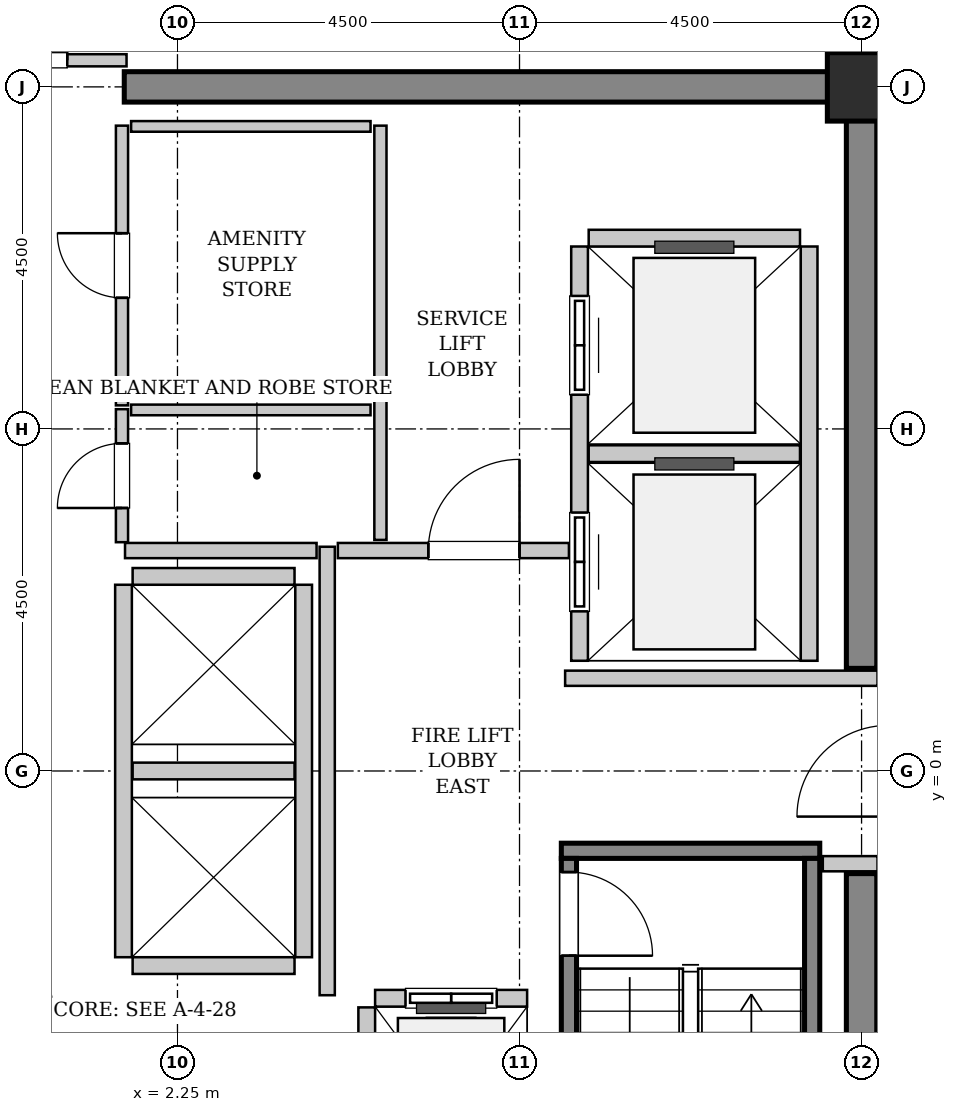
"""IFC4 building model, lengths in metres.
Left out: names, types, materials, properties, quantities, classifications, styles, units other than length and angle.
Written with IfcOpenShell. Run it as: python <this file> out.ifc"""

import sys

from ifc_helpers import new_model, si_unit, direction, frame, frame_2d, origin, origin_2d, place, context, subcontext, project, spatial, rectangle, extrude, source, transform, mapped, element, fill, save


model = new_model("IFC4")
c1 = context("Model", 3, precision=1e-05, world=origin(), true_north=direction((0.0, 1.0)))
c2 = subcontext(c1, "Body", "Model", "MODEL_VIEW")
j1 = project(units=[si_unit("LENGTHUNIT", "METRE"), si_unit("PLANEANGLEUNIT", "RADIAN")], contexts=[c1])
p1 = place(None, origin())
s1 = spatial("IfcSite", under=j1, at=p1, CompositionType="ELEMENT")
p2 = place(p1, origin())
s2 = spatial("IfcBuilding", under=s1, at=p2, CompositionType="ELEMENT")
p3 = place(p2, frame((0.0, 0.0, 330.0)))
s3 = spatial("IfcBuildingStorey", under=s2, at=p3, CompositionType="ELEMENT", Elevation=330.0)
m1 = source(origin(), c2, "Body", "SweptSolid", [
    extrude(rectangle(XDim=9.9, YDim=0.4, at=frame_2d((4.95, 0.0))), origin(), (0.0, 0.0, 1.0), 3.8),
])
p4 = place(p3, frame((1.55, 9.0, 0.0), z_axis=(0.0, 0.0, 1.0), x_axis=(1.0, 0.0, 0.0)))
e1 = element("IfcWall", 1, at=p4, inside=s3, PredefinedType="SHEAR", context=c2, shape_type="MappedRepresentation", body=[
    mapped(m1, transform((0.0, 0.0, 0.0), x_axis=(1.0, 0.0, 0.0), y_axis=(0.0, 1.0, 0.0), z_axis=(0.0, 0.0, 1.0), scale=1.0)),
])
m2 = source(origin(), c2, "Body", "SweptSolid", [
    extrude(rectangle(XDim=7.45, YDim=0.4, at=frame_2d((3.725, 0.0))), origin(), (0.0, 0.0, 1.0), 3.8),
])
for number, where, z_axis, x_axis in (
    (2, (11.25, -8.8, 0.0), (0.0, 0.0, 1.0), (0.0, 1.0, 0.0)),
    (3, (11.25, 1.35, 0.0), (0.0, 0.0, 1.0), (0.0, 1.0, 0.0)),
):
    element("IfcWall", number, at=place(p3, frame(where, z_axis=z_axis, x_axis=x_axis)), inside=s3, PredefinedType="SHEAR", context=c2, shape_type="MappedRepresentation", body=[
        mapped(m2, transform((0.0, 0.0, 0.0), x_axis=(1.0, 0.0, 0.0), y_axis=(0.0, 1.0, 0.0), z_axis=(0.0, 0.0, 1.0), scale=1.0)),
    ])
m3 = source(origin(), c2, "Body", "SweptSolid", [
    extrude(rectangle(XDim=0.9, YDim=0.9, at=origin_2d()), origin(), (0.0, 0.0, 1.0), 3.8),
])
p5 = place(p3, frame((11.25, 9.0, 0.0), z_axis=(0.0, 0.0, 1.0), x_axis=(1.0, 0.0, 0.0)))
e4 = element("IfcColumn", 4, at=p5, inside=s3, PredefinedType="COLUMN", context=c2, shape_type="MappedRepresentation", body=[
    mapped(m3, transform((0.0, 0.0, 0.0), x_axis=(1.0, 0.0, 0.0), y_axis=(0.0, 1.0, 0.0), z_axis=(0.0, 0.0, 1.0), scale=1.0)),
])
m4 = source(origin(), c2, "Body", "SweptSolid", [
    extrude(rectangle(XDim=3.4, YDim=0.2, at=frame_2d((1.7, 0.0))), origin(), (0.0, 0.0, 1.0), 3.8),
])
p6 = place(p3, frame((7.3, -1.05, 0.0), z_axis=(0.0, 0.0, 1.0), x_axis=(1.0, 0.0, 0.0)))
e5 = element("IfcWall", 5, at=p6, inside=s3, PredefinedType="SOLIDWALL", context=c2, shape_type="MappedRepresentation", body=[
    mapped(m4, transform((0.0, 0.0, 0.0), x_axis=(1.0, 0.0, 0.0), y_axis=(0.0, 1.0, 0.0), z_axis=(0.0, 0.0, 1.0), scale=1.0)),
])
m5 = source(origin(), c2, "Body", "SweptSolid", [
    extrude(rectangle(XDim=7.1, YDim=0.2, at=frame_2d((3.55, 0.0))), origin(), (0.0, 0.0, 1.0), 3.8),
])
p7 = place(p3, frame((7.4, -1.15, 0.0), z_axis=(0.0, 0.0, 1.0), x_axis=(0.0, -1.0, 0.0)))
e6 = element("IfcWall", 6, at=p7, inside=s3, PredefinedType="SOLIDWALL", context=c2, shape_type="MappedRepresentation", body=[
    mapped(m5, transform((0.0, 0.0, 0.0), x_axis=(1.0, 0.0, 0.0), y_axis=(0.0, 1.0, 0.0), z_axis=(0.0, 0.0, 1.0), scale=1.0)),
])
p8 = place(p7, frame((0.18, 0.0, 0.0)))
e7 = element("IfcOpeningElement", 7, at=p8, cuts=e6, PredefinedType="OPENING", context=c2, shape_type="SweptSolid", body=[
    extrude(rectangle(XDim=1.1, YDim=2.15, at=frame_2d((0.55, 1.075))), frame((0.0, 0.11, 0.0), z_axis=(0.0, -1.0, 0.0), x_axis=(1.0, 0.0, 0.0)), (0.0, 0.0, 1.0), 0.22),
])
p9 = place(p3, frame((10.6, -1.15, 0.0), z_axis=(0.0, 0.0, 1.0), x_axis=(0.0, -1.0, 0.0)))
e8 = element("IfcWall", 8, at=p9, inside=s3, PredefinedType="SOLIDWALL", context=c2, shape_type="MappedRepresentation", body=[
    mapped(m5, transform((0.0, 0.0, 0.0), x_axis=(1.0, 0.0, 0.0), y_axis=(0.0, 1.0, 0.0), z_axis=(0.0, 0.0, 1.0), scale=1.0)),
])
m6 = source(origin(), c2, "Body", "SweptSolid", [
    extrude(rectangle(XDim=2.0, YDim=0.22, at=frame_2d((1.0, 0.0))), origin(), (0.0, 0.0, 1.0), 3.535),
])
p10 = place(p3, frame((6.85, -2.99, 0.0), z_axis=(0.0, 0.0, 1.0), x_axis=(-1.0, 0.0, 0.0)))
e9 = element("IfcWall", 9, at=p10, inside=s3, PredefinedType="SOLIDWALL", context=c2, shape_type="MappedRepresentation", body=[
    mapped(m6, transform((0.0, 0.0, 0.0), x_axis=(1.0, 0.0, 0.0), y_axis=(0.0, 1.0, 0.0), z_axis=(0.0, 0.0, 1.0), scale=1.0)),
])
p11 = place(p10, frame((0.4, 0.0, 0.0)))
e10 = element("IfcOpeningElement", 10, at=p11, cuts=e9, PredefinedType="OPENING", context=c2, shape_type="SweptSolid", body=[
    extrude(rectangle(XDim=1.2, YDim=2.2, at=frame_2d((0.6, 1.1))), frame((0.0, 0.12, 0.0), z_axis=(0.0, -1.0, 0.0), x_axis=(1.0, 0.0, 0.0)), (0.0, 0.0, 1.0), 0.24),
])
m7 = source(origin(), c2, "Body", "SweptSolid", [
    extrude(rectangle(XDim=2.68, YDim=0.22, at=frame_2d((1.34, 0.0))), origin(), (0.0, 0.0, 1.0), 3.535),
])
p12 = place(p3, frame((4.74, -3.11, 0.0), z_axis=(0.0, 0.0, 1.0), x_axis=(0.0, -1.0, 0.0)))
e11 = element("IfcWall", 11, at=p12, inside=s3, PredefinedType="SOLIDWALL", context=c2, shape_type="MappedRepresentation", body=[
    mapped(m7, transform((0.0, 0.0, 0.0), x_axis=(1.0, 0.0, 0.0), y_axis=(0.0, 1.0, 0.0), z_axis=(0.0, 0.0, 1.0), scale=1.0)),
])
m8 = source(origin(), c2, "Body", "SweptSolid", [
    extrude(rectangle(XDim=5.45, YDim=0.22, at=frame_2d((2.725, 0.0))), origin(), (0.0, 0.0, 1.0), 3.535),
])
p13 = place(p3, frame((7.54, 6.9, 0.0), z_axis=(0.0, 0.0, 1.0), x_axis=(0.0, -1.0, 0.0)))
e12 = element("IfcWall", 12, at=p13, inside=s3, PredefinedType="SOLIDWALL", context=c2, shape_type="MappedRepresentation", body=[
    mapped(m8, transform((0.0, 0.0, 0.0), x_axis=(1.0, 0.0, 0.0), y_axis=(0.0, 1.0, 0.0), z_axis=(0.0, 0.0, 1.0), scale=1.0)),
])
p14 = place(p13, frame((3.5, 0.0, 0.0)))
e13 = element("IfcOpeningElement", 13, at=p14, cuts=e12, PredefinedType="OPENING", context=c2, shape_type="SweptSolid", body=[
    extrude(rectangle(XDim=1.3, YDim=2.3, at=frame_2d((0.65, 1.15))), frame((0.0, 0.12, 0.0), z_axis=(0.0, -1.0, 0.0), x_axis=(1.0, 0.0, 0.0)), (0.0, 0.0, 1.0), 0.24),
])
p15 = place(p13, frame((0.65, 0.0, 0.0)))
e14 = element("IfcOpeningElement", 14, at=p15, cuts=e12, PredefinedType="OPENING", context=c2, shape_type="SweptSolid", body=[
    extrude(rectangle(XDim=1.3, YDim=2.3, at=frame_2d((0.65, 1.15))), frame((0.0, 0.12, 0.0), z_axis=(0.0, -1.0, 0.0), x_axis=(1.0, 0.0, 0.0)), (0.0, 0.0, 1.0), 0.24),
])
p16 = place(p3, frame((10.56, 1.45, 0.0), z_axis=(0.0, 0.0, 1.0), x_axis=(0.0, 1.0, 0.0)))
e15 = element("IfcWall", 15, at=p16, inside=s3, PredefinedType="SOLIDWALL", context=c2, shape_type="MappedRepresentation", body=[
    mapped(m8, transform((0.0, 0.0, 0.0), x_axis=(1.0, 0.0, 0.0), y_axis=(0.0, 1.0, 0.0), z_axis=(0.0, 0.0, 1.0), scale=1.0)),
])
m9 = source(origin(), c2, "Body", "SweptSolid", [
    extrude(rectangle(XDim=2.78, YDim=0.22, at=frame_2d((1.39, 0.0))), origin(), (0.0, 0.0, 1.0), 3.535),
])
for number, where, z_axis, x_axis in (
    (16, (7.66, 4.175, 0.0), (0.0, 0.0, 1.0), (1.0, 0.0, 0.0)),
    (17, (10.44, 7.01, 0.0), (0.0, 0.0, 1.0), (-1.0, 0.0, 0.0)),
):
    element("IfcWall", number, at=place(p3, frame(where, z_axis=z_axis, x_axis=x_axis)), inside=s3, PredefinedType="SOLIDWALL", context=c2, shape_type="MappedRepresentation", body=[
        mapped(m9, transform((0.0, 0.0, 0.0), x_axis=(1.0, 0.0, 0.0), y_axis=(0.0, 1.0, 0.0), z_axis=(0.0, 0.0, 1.0), scale=1.0)),
    ])
m10 = source(origin(), c2, "Body", "SweptSolid", [
    extrude(rectangle(XDim=4.9, YDim=0.22, at=frame_2d((2.45, 0.0))), origin(), (0.0, 0.0, 1.0), 3.535),
])
for number, where, z_axis, x_axis in (
    (18, (1.54, 2.45, 0.0), (0.0, 0.0, 1.0), (0.0, -1.0, 0.0)),
    (19, (3.91, -2.45, 0.0), (0.0, 0.0, 1.0), (0.0, 1.0, 0.0)),
):
    element("IfcWall", number, at=place(p3, frame(where, z_axis=z_axis, x_axis=x_axis)), inside=s3, PredefinedType="SOLIDWALL", context=c2, shape_type="MappedRepresentation", body=[
        mapped(m10, transform((0.0, 0.0, 0.0), x_axis=(1.0, 0.0, 0.0), y_axis=(0.0, 1.0, 0.0), z_axis=(0.0, 0.0, 1.0), scale=1.0)),
    ])
m11 = source(origin(), c2, "Body", "SweptSolid", [
    extrude(rectangle(XDim=2.13, YDim=0.22, at=frame_2d((1.065, 0.0))), origin(), (0.0, 0.0, 1.0), 3.535),
])
for number, where, z_axis, x_axis in (
    (20, (1.66, -2.56, 0.0), (0.0, 0.0, 1.0), (1.0, 0.0, 0.0)),
    (21, (1.66, 0.0, 0.0), (0.0, 0.0, 1.0), (1.0, 0.0, 0.0)),
    (22, (3.79, 2.56, 0.0), (0.0, 0.0, 1.0), (-1.0, 0.0, 0.0)),
):
    element("IfcWall", number, at=place(p3, frame(where, z_axis=z_axis, x_axis=x_axis)), inside=s3, PredefinedType="SOLIDWALL", context=c2, shape_type="MappedRepresentation", body=[
        mapped(m11, transform((0.0, 0.0, 0.0), x_axis=(1.0, 0.0, 0.0), y_axis=(0.0, 1.0, 0.0), z_axis=(0.0, 0.0, 1.0), scale=1.0)),
    ])
m12 = source(origin(), c2, "Body", "SweptSolid", [
    extrude(rectangle(XDim=5.9, YDim=0.2, at=frame_2d((2.95, 0.0))), origin(), (0.0, 0.0, 1.0), 3.535),
])
p17 = place(p3, frame((4.22, -2.95, 0.0), z_axis=(0.0, 0.0, 1.0), x_axis=(0.0, 1.0, 0.0)))
e23 = element("IfcWall", 23, at=p17, inside=s3, PredefinedType="PARTITIONING", context=c2, shape_type="MappedRepresentation", body=[
    mapped(m12, transform((0.0, 0.0, 0.0), x_axis=(1.0, 0.0, 0.0), y_axis=(0.0, 1.0, 0.0), z_axis=(0.0, 0.0, 1.0), scale=1.0)),
])
m13 = source(origin(), c2, "Body", "SweptSolid", [
    extrude(rectangle(XDim=2.52, YDim=0.2, at=frame_2d((1.26, 0.0))), origin(), (0.0, 0.0, 1.0), 3.535),
])
p18 = place(p3, frame((1.56, 2.9, 0.0), z_axis=(0.0, 0.0, 1.0), x_axis=(1.0, 0.0, 0.0)))
e24 = element("IfcWall", 24, at=p18, inside=s3, PredefinedType="PARTITIONING", context=c2, shape_type="MappedRepresentation", body=[
    mapped(m13, transform((0.0, 0.0, 0.0), x_axis=(1.0, 0.0, 0.0), y_axis=(0.0, 1.0, 0.0), z_axis=(0.0, 0.0, 1.0), scale=1.0)),
])
m14 = source(origin(), c2, "Body", "SweptSolid", [
    extrude(rectangle(XDim=3.04, YDim=0.2, at=frame_2d((1.52, 0.0))), origin(), (0.0, 0.0, 1.0), 3.535),
])
p19 = place(p3, frame((4.36, 2.9, 0.0), z_axis=(0.0, 0.0, 1.0), x_axis=(1.0, 0.0, 0.0)))
e25 = element("IfcWall", 25, at=p19, inside=s3, PredefinedType="PARTITIONING", context=c2, shape_type="MappedRepresentation", body=[
    mapped(m14, transform((0.0, 0.0, 0.0), x_axis=(1.0, 0.0, 0.0), y_axis=(0.0, 1.0, 0.0), z_axis=(0.0, 0.0, 1.0), scale=1.0)),
])
p20 = place(p19, frame((1.19, 0.0, 0.0)))
e26 = element("IfcOpeningElement", 26, at=p20, cuts=e25, PredefinedType="OPENING", context=c2, shape_type="SweptSolid", body=[
    extrude(rectangle(XDim=1.2, YDim=2.15, at=frame_2d((0.6, 1.075))), frame((0.0, 0.11, 0.0), z_axis=(0.0, -1.0, 0.0), x_axis=(1.0, 0.0, 0.0)), (0.0, 0.0, 1.0), 0.22),
])
m15 = source(origin(), c2, "Body", "SweptSolid", [
    extrude(rectangle(XDim=4.11, YDim=0.2, at=frame_2d((2.055, 0.0))), origin(), (0.0, 0.0, 1.0), 3.535),
])
p21 = place(p3, frame((7.35, 1.22, 0.0), z_axis=(0.0, 0.0, 1.0), x_axis=(1.0, 0.0, 0.0)))
e27 = element("IfcWall", 27, at=p21, inside=s3, PredefinedType="PARTITIONING", context=c2, shape_type="MappedRepresentation", body=[
    mapped(m15, transform((0.0, 0.0, 0.0), x_axis=(1.0, 0.0, 0.0), y_axis=(0.0, 1.0, 0.0), z_axis=(0.0, 0.0, 1.0), scale=1.0)),
])
m16 = source(origin(), c2, "Body", "SweptSolid", [
    extrude(rectangle(XDim=0.72, YDim=0.2, at=frame_2d((0.36, 0.0))), origin(), (0.0, 0.0, 1.0), 3.535),
])
p22 = place(p3, frame((10.74, -1.22, 0.0), z_axis=(0.0, 0.0, 1.0), x_axis=(1.0, 0.0, 0.0)))
e28 = element("IfcWall", 28, at=p22, inside=s3, PredefinedType="PARTITIONING", context=c2, shape_type="MappedRepresentation", body=[
    mapped(m16, transform((0.0, 0.0, 0.0), x_axis=(1.0, 0.0, 0.0), y_axis=(0.0, 1.0, 0.0), z_axis=(0.0, 0.0, 1.0), scale=1.0)),
])
m17 = source(origin(), c2, "Body", "SweptSolid", [
    extrude(rectangle(XDim=3.16, YDim=0.16, at=frame_2d((1.58, 0.0))), origin(), (0.0, 0.0, 1.0), 2.625),
])
p23 = place(p3, frame((-1.58, 9.35, 0.0), z_axis=(0.0, 0.0, 1.0), x_axis=(1.0, 0.0, 0.0)))
e29 = element("IfcWall", 29, at=p23, inside=s3, PredefinedType="PARTITIONING", context=c2, shape_type="MappedRepresentation", body=[
    mapped(m17, transform((0.0, 0.0, 0.0), x_axis=(1.0, 0.0, 0.0), y_axis=(0.0, 1.0, 0.0), z_axis=(0.0, 0.0, 1.0), scale=1.0)),
])
p24 = place(p23, frame((0.78, 0.0, 0.0)))
e30 = element("IfcOpeningElement", 30, at=p24, cuts=e29, PredefinedType="OPENING", context=c2, shape_type="SweptSolid", body=[
    extrude(rectangle(XDim=1.6, YDim=2.3, at=frame_2d((0.8, 1.15))), frame((0.0, 0.09, 0.0), z_axis=(0.0, -1.0, 0.0), x_axis=(1.0, 0.0, 0.0)), (0.0, 0.0, 1.0), 0.18),
])
m18 = source(origin(), c2, "Body", "SweptSolid", [
    extrude(rectangle(XDim=5.45, YDim=0.16, at=frame_2d((2.725, 0.0))), origin(), (0.0, 0.0, 1.0), 3.535),
])
p25 = place(p3, frame((4.92, 3.04, 0.0), z_axis=(0.0, 0.0, 1.0), x_axis=(0.0, 1.0, 0.0)))
e31 = element("IfcWall", 31, at=p25, inside=s3, PredefinedType="PARTITIONING", context=c2, shape_type="MappedRepresentation", body=[
    mapped(m18, transform((0.0, 0.0, 0.0), x_axis=(1.0, 0.0, 0.0), y_axis=(0.0, 1.0, 0.0), z_axis=(0.0, 0.0, 1.0), scale=1.0)),
])
m19 = source(origin(), c2, "Body", "SweptSolid", [
    extrude(rectangle(XDim=1.75, YDim=0.16, at=frame_2d((0.875, 0.0))), origin(), (0.0, 0.0, 1.0), 3.535),
])
p26 = place(p3, frame((1.52, 3.01, 0.0), z_axis=(0.0, 0.0, 1.0), x_axis=(0.0, 1.0, 0.0)))
e32 = element("IfcWall", 32, at=p26, inside=s3, PredefinedType="PARTITIONING", context=c2, shape_type="MappedRepresentation", body=[
    mapped(m19, transform((0.0, 0.0, 0.0), x_axis=(1.0, 0.0, 0.0), y_axis=(0.0, 1.0, 0.0), z_axis=(0.0, 0.0, 1.0), scale=1.0)),
])
p27 = place(p26, frame((0.45, 0.0, 0.0)))
e33 = element("IfcOpeningElement", 33, at=p27, cuts=e32, PredefinedType="OPENING", context=c2, shape_type="SweptSolid", body=[
    extrude(rectangle(XDim=0.85, YDim=2.1, at=frame_2d((0.425, 1.05))), frame((0.0, 0.09, 0.0), z_axis=(0.0, -1.0, 0.0), x_axis=(1.0, 0.0, 0.0)), (0.0, 0.0, 1.0), 0.18),
])
m20 = source(origin(), c2, "Body", "SweptSolid", [
    extrude(rectangle(XDim=3.15, YDim=0.14, at=frame_2d((1.575, 0.0))), origin(), (0.0, 0.0, 1.0), 3.535),
])
p28 = place(p3, frame((1.64, 4.75, 0.0), z_axis=(0.0, 0.0, 1.0), x_axis=(1.0, 0.0, 0.0)))
e34 = element("IfcWall", 34, at=p28, inside=s3, PredefinedType="PARTITIONING", context=c2, shape_type="MappedRepresentation", body=[
    mapped(m20, transform((0.0, 0.0, 0.0), x_axis=(1.0, 0.0, 0.0), y_axis=(0.0, 1.0, 0.0), z_axis=(0.0, 0.0, 1.0), scale=1.0)),
])
m21 = source(origin(), c2, "Body", "SweptSolid", [
    extrude(rectangle(XDim=3.68, YDim=0.16, at=frame_2d((1.84, 0.0))), origin(), (0.0, 0.0, 1.0), 3.535),
])
p29 = place(p3, frame((1.52, 4.81, 0.0), z_axis=(0.0, 0.0, 1.0), x_axis=(0.0, 1.0, 0.0)))
e35 = element("IfcWall", 35, at=p29, inside=s3, PredefinedType="PARTITIONING", context=c2, shape_type="MappedRepresentation", body=[
    mapped(m21, transform((0.0, 0.0, 0.0), x_axis=(1.0, 0.0, 0.0), y_axis=(0.0, 1.0, 0.0), z_axis=(0.0, 0.0, 1.0), scale=1.0)),
])
p30 = place(p29, frame((1.415, 0.0, 0.0)))
e36 = element("IfcOpeningElement", 36, at=p30, cuts=e35, PredefinedType="OPENING", context=c2, shape_type="SweptSolid", body=[
    extrude(rectangle(XDim=0.85, YDim=2.1, at=frame_2d((0.425, 1.05))), frame((0.0, 0.09, 0.0), z_axis=(0.0, -1.0, 0.0), x_axis=(1.0, 0.0, 0.0)), (0.0, 0.0, 1.0), 0.18),
])
p31 = place(p3, frame((1.64, 8.48, 0.0), z_axis=(0.0, 0.0, 1.0), x_axis=(1.0, 0.0, 0.0)))
e37 = element("IfcWall", 37, at=p31, inside=s3, PredefinedType="PARTITIONING", context=c2, shape_type="MappedRepresentation", body=[
    mapped(m20, transform((0.0, 0.0, 0.0), x_axis=(1.0, 0.0, 0.0), y_axis=(0.0, 1.0, 0.0), z_axis=(0.0, 0.0, 1.0), scale=1.0)),
])
m22 = source(origin(), c2, "Body", "SweptSolid", [
    extrude(rectangle(XDim=1.1, YDim=2.15, at=frame_2d((0.55, 1.075))), frame((0.0, 0.025, 0.0), z_axis=(0.0, -1.0, 0.0), x_axis=(1.0, 0.0, 0.0)), (0.0, 0.0, 1.0), 0.05),
])
p32 = place(p8, origin())
e38 = element("IfcDoor", 38, at=p32, inside=s3, OperationType="SINGLE_SWING_RIGHT", PredefinedType="DOOR", context=c2, shape_type="MappedRepresentation", body=[
    mapped(m22, transform((0.0, 0.0, 0.0), x_axis=(1.0, 0.0, 0.0), y_axis=(0.0, 1.0, 0.0), z_axis=(0.0, 0.0, 1.0), scale=1.0)),
])
fill(e7, e38)
m23 = source(origin(), c2, "Body", "SweptSolid", [
    extrude(rectangle(XDim=1.2, YDim=2.2, at=frame_2d((0.6, 1.1))), frame((0.0, 0.025, 0.0), z_axis=(0.0, -1.0, 0.0), x_axis=(1.0, 0.0, 0.0)), (0.0, 0.0, 1.0), 0.05),
])
p33 = place(p11, origin())
e39 = element("IfcDoor", 39, at=p33, inside=s3, OperationType="SLIDING_TO_LEFT", PredefinedType="DOOR", context=c2, shape_type="MappedRepresentation", body=[
    mapped(m23, transform((0.0, 0.0, 0.0), x_axis=(1.0, 0.0, 0.0), y_axis=(0.0, 1.0, 0.0), z_axis=(0.0, 0.0, 1.0), scale=1.0)),
])
fill(e10, e39)
m24 = source(origin(), c2, "Body", "SweptSolid", [
    extrude(rectangle(XDim=1.3, YDim=2.3, at=frame_2d((0.65, 1.15))), frame((0.0, 0.025, 0.0), z_axis=(0.0, -1.0, 0.0), x_axis=(1.0, 0.0, 0.0)), (0.0, 0.0, 1.0), 0.05),
])
p34 = place(p14, origin())
e40 = element("IfcDoor", 40, at=p34, inside=s3, OperationType="SLIDING_TO_RIGHT", PredefinedType="DOOR", context=c2, shape_type="MappedRepresentation", body=[
    mapped(m24, transform((0.0, 0.0, 0.0), x_axis=(1.0, 0.0, 0.0), y_axis=(0.0, 1.0, 0.0), z_axis=(0.0, 0.0, 1.0), scale=1.0)),
])
fill(e13, e40)
p35 = place(p15, origin())
e41 = element("IfcDoor", 41, at=p35, inside=s3, OperationType="SLIDING_TO_RIGHT", PredefinedType="DOOR", context=c2, shape_type="MappedRepresentation", body=[
    mapped(m24, transform((0.0, 0.0, 0.0), x_axis=(1.0, 0.0, 0.0), y_axis=(0.0, 1.0, 0.0), z_axis=(0.0, 0.0, 1.0), scale=1.0)),
])
fill(e14, e41)
m25 = source(origin(), c2, "Body", "SweptSolid", [
    extrude(rectangle(XDim=1.2, YDim=2.15, at=frame_2d((0.6, 1.075))), frame((0.0, 0.025, 0.0), z_axis=(0.0, -1.0, 0.0), x_axis=(1.0, 0.0, 0.0)), (0.0, 0.0, 1.0), 0.05),
])
p36 = place(p20, origin())
e42 = element("IfcDoor", 42, at=p36, inside=s3, OperationType="SINGLE_SWING_RIGHT", PredefinedType="DOOR", context=c2, shape_type="MappedRepresentation", body=[
    mapped(m25, transform((0.0, 0.0, 0.0), x_axis=(1.0, 0.0, 0.0), y_axis=(0.0, 1.0, 0.0), z_axis=(0.0, 0.0, 1.0), scale=1.0)),
])
fill(e26, e42)
m26 = source(origin(), c2, "Body", "SweptSolid", [
    extrude(rectangle(XDim=1.6, YDim=2.3, at=frame_2d((0.8, 1.15))), frame((0.0, 0.025, 0.0), z_axis=(0.0, -1.0, 0.0), x_axis=(1.0, 0.0, 0.0)), (0.0, 0.0, 1.0), 0.05),
])
p37 = place(p24, origin())
e43 = element("IfcDoor", 43, at=p37, inside=s3, OperationType="DOUBLE_DOOR_SINGLE_SWING", PredefinedType="DOOR", context=c2, shape_type="MappedRepresentation", body=[
    mapped(m26, transform((0.0, 0.0, 0.0), x_axis=(1.0, 0.0, 0.0), y_axis=(0.0, 1.0, 0.0), z_axis=(0.0, 0.0, 1.0), scale=1.0)),
])
fill(e30, e43)
m27 = source(origin(), c2, "Body", "SweptSolid", [
    extrude(rectangle(XDim=0.85, YDim=2.1, at=frame_2d((0.425, 1.05))), frame((0.0, 0.025, 0.0), z_axis=(0.0, -1.0, 0.0), x_axis=(1.0, 0.0, 0.0)), (0.0, 0.0, 1.0), 0.05),
])
p38 = place(p27, origin())
e44 = element("IfcDoor", 44, at=p38, inside=s3, OperationType="SINGLE_SWING_LEFT", PredefinedType="DOOR", context=c2, shape_type="MappedRepresentation", body=[
    mapped(m27, transform((0.0, 0.0, 0.0), x_axis=(1.0, 0.0, 0.0), y_axis=(0.0, 1.0, 0.0), z_axis=(0.0, 0.0, 1.0), scale=1.0)),
])
fill(e33, e44)
p39 = place(p30, origin())
e45 = element("IfcDoor", 45, at=p39, inside=s3, OperationType="SINGLE_SWING_RIGHT", PredefinedType="DOOR", context=c2, shape_type="MappedRepresentation", body=[
    mapped(m27, transform((0.0, 0.0, 0.0), x_axis=(1.0, 0.0, 0.0), y_axis=(0.0, 1.0, 0.0), z_axis=(0.0, 0.0, 1.0), scale=1.0)),
])
fill(e36, e45)
save(model, sys.argv[1])
